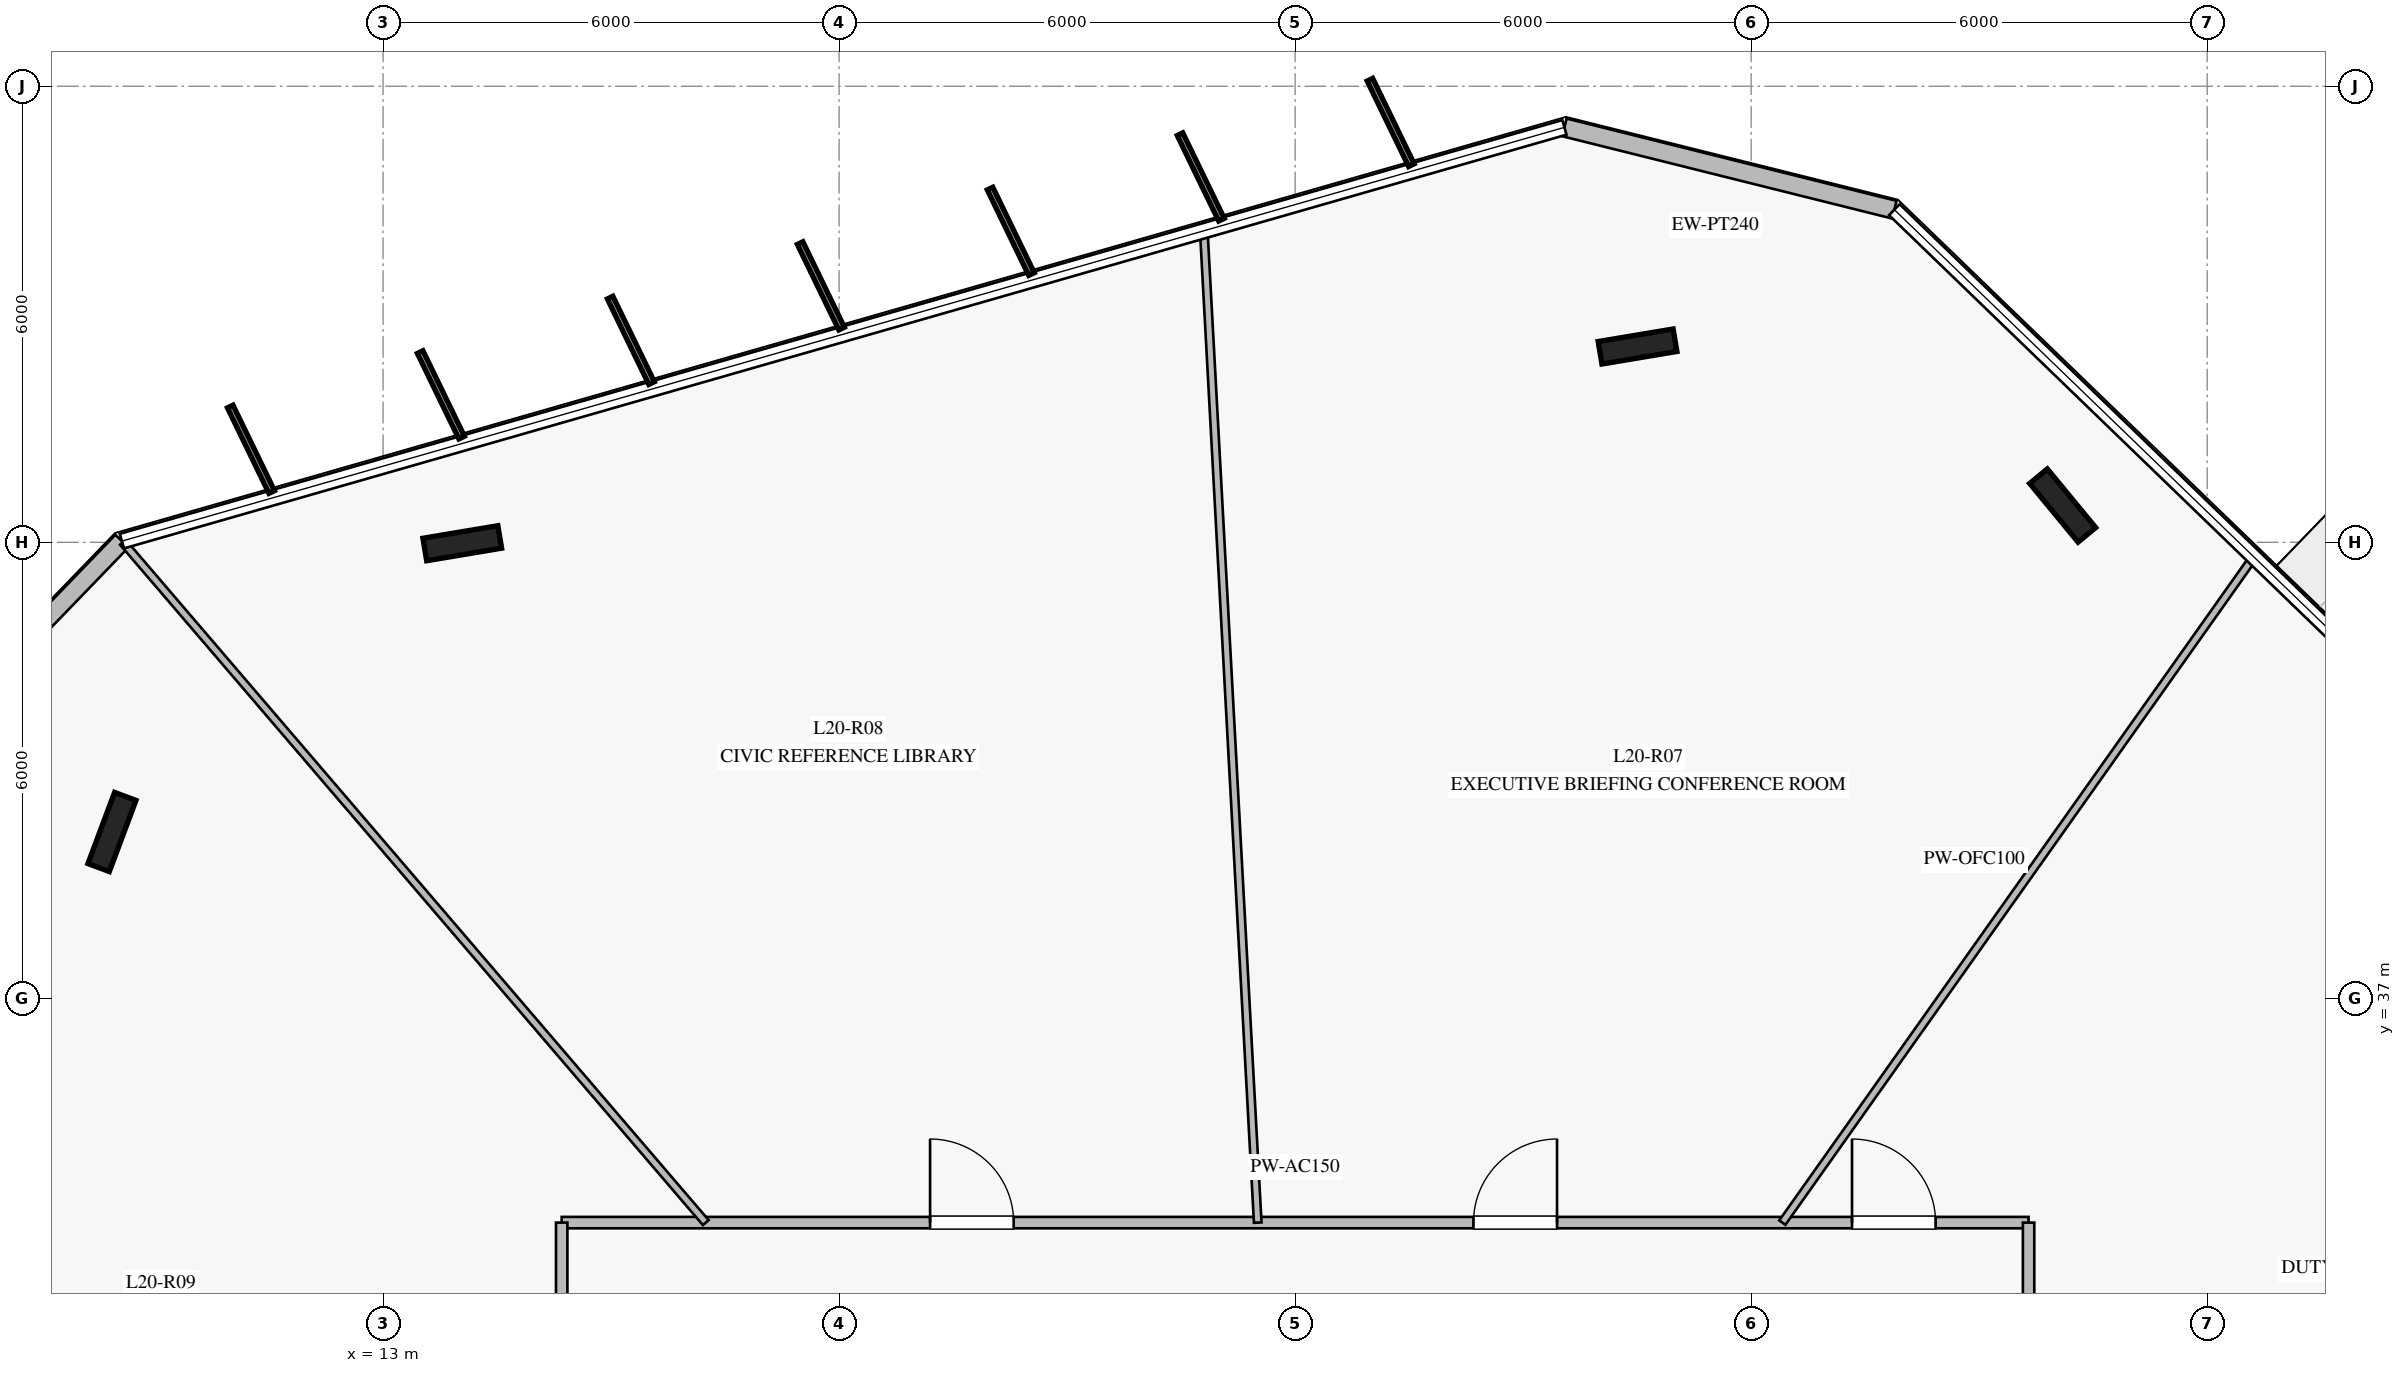
"""IFC4 building model, lengths in metres.
Left out: names, types, materials, properties, quantities, classifications, styles, units other than length and angle.
Written with IfcOpenShell. Run it as: python <this file> out.ifc"""

import sys

from ifc_helpers import new_model, si_unit, direction, frame, frame_2d, origin, origin_2d, place, context, subcontext, project, spatial, rectangle, i_section, extrude, element, fill, save


model = new_model("IFC4")
c1 = context("Model", 3, precision=1e-05, world=origin(), true_north=direction((0.0, 1.0)))
c2 = subcontext(c1, "Body", "Model", "MODEL_VIEW")
j1 = project(units=[si_unit("LENGTHUNIT", "METRE"), si_unit("PLANEANGLEUNIT", "RADIAN")], contexts=[c1])
p1 = place(None, origin())
s1 = spatial("IfcSite", under=j1, at=p1, CompositionType="ELEMENT")
p2 = place(p1, origin())
s2 = spatial("IfcBuilding", under=s1, at=p2, CompositionType="ELEMENT")
p3 = place(p2, frame((0.0, 0.0, 84.0)))
s3 = spatial("IfcBuildingStorey", under=s2, at=p3, CompositionType="ELEMENT", Elevation=84.0)
for number, where, z_axis, x_axis in (
    (1, (35.099, 43.484, 0.0), (0.0, 0.0, 1.0), (-0.636, 0.772, 0.0)),
    (2, (29.505, 45.576, 0.0), (0.0, 0.0, 1.0), (0.986, 0.165, 0.0)),
    (3, (14.042, 42.988, 0.0), (0.0, 0.0, 1.0), (0.986, 0.165, 0.0)),
    (4, (9.433, 39.189, 0.0), (0.0, 0.0, 1.0), (0.35, 0.937, 0.0)),
):
    element("IfcColumn", number, at=place(p3, frame(where, z_axis=z_axis, x_axis=x_axis)), inside=s3, PredefinedType="COLUMN", context=c2, shape_type="SweptSolid", body=[
        extrude(i_section(OverallWidth=0.3, OverallDepth=1.0, WebThickness=0.019, FlangeThickness=0.036, at=origin_2d()), origin(), (0.0, 0.0, 1.0), 4.0),
    ])
p4 = place(p3, frame((32.884, 47.376, 0.0), z_axis=(0.0, 0.0, 1.0), x_axis=(-0.970261147955, 0.242060539471, 0.0)))
e5 = element("IfcWall", 5, at=p4, inside=s3, PredefinedType="STANDARD", context=c2, shape_type="SweptSolid", body=[
    extrude(rectangle(XDim=4.474, YDim=0.24, at=frame_2d((2.237, 0.0))), origin(), (0.0, 0.0, 1.0), 3.76),
])
p5 = place(p3, frame((9.564, 43.016, 0.0), z_axis=(0.0, 0.0, 1.0), x_axis=(-0.694693843806, -0.719305542435, 0.0)))
e6 = element("IfcWall", 6, at=p5, inside=s3, PredefinedType="STANDARD", context=c2, shape_type="SweptSolid", body=[
    extrude(rectangle(XDim=4.474, YDim=0.24, at=frame_2d((2.237, 0.0))), origin(), (0.0, 0.0, 1.0), 3.76),
])
p6 = place(p3, frame((15.35, 34.05, 0.0), z_axis=(0.0, 0.0, 1.0), x_axis=(1.0, 0.0, 0.0)))
e7 = element("IfcWall", 7, at=p6, inside=s3, PredefinedType="PARTITIONING", context=c2, shape_type="SweptSolid", body=[
    extrude(rectangle(XDim=19.3, YDim=0.15, at=frame_2d((9.65, 0.0))), origin(), (0.0, 0.0, 1.0), 3.21),
])
p7 = place(p6, frame((16.977, 0.0, 0.0)))
e8 = element("IfcOpeningElement", 8, at=p7, cuts=e7, PredefinedType="OPENING", context=c2, shape_type="SweptSolid", body=[
    extrude(rectangle(XDim=1.1, YDim=2.2, at=frame_2d((0.55, 1.1))), frame((0.0, 0.085, 0.0), z_axis=(0.0, -1.0, 0.0), x_axis=(1.0, 0.0, 0.0)), (0.0, 0.0, 1.0), 0.17),
])
p8 = place(p6, frame((11.996, 0.0, 0.0)))
e9 = element("IfcOpeningElement", 9, at=p8, cuts=e7, PredefinedType="OPENING", context=c2, shape_type="SweptSolid", body=[
    extrude(rectangle(XDim=1.1, YDim=2.2, at=frame_2d((0.55, 1.1))), frame((0.0, 0.085, 0.0), z_axis=(0.0, -1.0, 0.0), x_axis=(1.0, 0.0, 0.0)), (0.0, 0.0, 1.0), 0.17),
])
p9 = place(p6, frame((4.847, 0.0, 0.0)))
e10 = element("IfcOpeningElement", 10, at=p9, cuts=e7, PredefinedType="OPENING", context=c2, shape_type="SweptSolid", body=[
    extrude(rectangle(XDim=1.1, YDim=2.2, at=frame_2d((0.55, 1.1))), frame((0.0, 0.085, 0.0), z_axis=(0.0, -1.0, 0.0), x_axis=(1.0, 0.0, 0.0)), (0.0, 0.0, 1.0), 0.17),
])
p10 = place(p3, frame((34.65, 34.05, 0.0), z_axis=(0.0, 0.0, 1.0), x_axis=(0.0, -1.0, 0.0)))
e11 = element("IfcWall", 11, at=p10, inside=s3, PredefinedType="PARTITIONING", context=c2, shape_type="SweptSolid", body=[
    extrude(rectangle(XDim=18.1, YDim=0.15, at=frame_2d((9.05, 0.0))), origin(), (0.0, 0.0, 1.0), 3.21),
])
p11 = place(p10, frame((15.308, 0.0, 0.0)))
e12 = element("IfcOpeningElement", 12, at=p11, cuts=e11, PredefinedType="OPENING", context=c2, shape_type="SweptSolid", body=[
    extrude(rectangle(XDim=1.1, YDim=2.2, at=frame_2d((0.55, 1.1))), frame((0.0, 0.085, 0.0), z_axis=(0.0, -1.0, 0.0), x_axis=(1.0, 0.0, 0.0)), (0.0, 0.0, 1.0), 0.17),
])
p12 = place(p10, frame((10.056, 0.0, 0.0)))
e13 = element("IfcOpeningElement", 13, at=p12, cuts=e11, PredefinedType="OPENING", context=c2, shape_type="SweptSolid", body=[
    extrude(rectangle(XDim=1.1, YDim=2.2, at=frame_2d((0.55, 1.1))), frame((0.0, 0.085, 0.0), z_axis=(0.0, -1.0, 0.0), x_axis=(1.0, 0.0, 0.0)), (0.0, 0.0, 1.0), 0.17),
])
p13 = place(p3, frame((15.35, 15.95, 0.0), z_axis=(0.0, 0.0, 1.0), x_axis=(0.0, 1.0, 0.0)))
e14 = element("IfcWall", 14, at=p13, inside=s3, PredefinedType="PARTITIONING", context=c2, shape_type="SweptSolid", body=[
    extrude(rectangle(XDim=18.1, YDim=0.15, at=frame_2d((9.05, 0.0))), origin(), (0.0, 0.0, 1.0), 3.21),
])
p14 = place(p13, frame((12.936, 0.0, 0.0)))
e15 = element("IfcOpeningElement", 15, at=p14, cuts=e14, PredefinedType="OPENING", context=c2, shape_type="SweptSolid", body=[
    extrude(rectangle(XDim=1.1, YDim=2.2, at=frame_2d((0.55, 1.1))), frame((0.0, 0.085, 0.0), z_axis=(0.0, -1.0, 0.0), x_axis=(1.0, 0.0, 0.0)), (0.0, 0.0, 1.0), 0.17),
])
p15 = place(p3, frame((31.41, 34.05, 0.0), z_axis=(0.0, 0.0, 1.0), x_axis=(0.577987627676, 0.816045527071, 0.0)))
e16 = element("IfcWall", 16, at=p15, inside=s3, PredefinedType="MOVABLE", context=c2, shape_type="SweptSolid", body=[
    extrude(rectangle(XDim=10.715, YDim=0.1, at=frame_2d((5.357, 0.0))), origin(), (0.0, 0.0, 1.0), 3.06),
])
p16 = place(p3, frame((24.508, 34.05, 0.0), z_axis=(0.0, 0.0, 1.0), x_axis=(-0.054331204266, 0.998522969312, 0.0)))
e17 = element("IfcWall", 17, at=p16, inside=s3, PredefinedType="MOVABLE", context=c2, shape_type="SweptSolid", body=[
    extrude(rectangle(XDim=13.049, YDim=0.1, at=frame_2d((6.525, 0.0))), origin(), (0.0, 0.0, 1.0), 3.05),
])
p17 = place(p3, frame((17.246, 34.05, 0.0), z_axis=(0.0, 0.0, 1.0), x_axis=(-0.650642961781, 0.759383787215, 0.0)))
e18 = element("IfcWall", 18, at=p17, inside=s3, PredefinedType="MOVABLE", context=c2, shape_type="SweptSolid", body=[
    extrude(rectangle(XDim=11.787, YDim=0.1, at=frame_2d((5.894, 0.0))), origin(), (0.0, 0.0, 1.0), 3.06),
])
p18 = place(p7, origin())
e19 = element("IfcDoor", 19, at=p18, inside=s3, OperationType="SINGLE_SWING_LEFT", PredefinedType="DOOR", context=c2, shape_type="SweptSolid", body=[
    extrude(rectangle(XDim=1.1, YDim=2.2, at=frame_2d((0.55, 1.1))), frame((0.0, 0.025, 0.0), z_axis=(0.0, -1.0, 0.0), x_axis=(1.0, 0.0, 0.0)), (0.0, 0.0, 1.0), 0.05),
])
fill(e8, e19)
p19 = place(p8, origin())
e20 = element("IfcDoor", 20, at=p19, inside=s3, OperationType="SINGLE_SWING_RIGHT", PredefinedType="DOOR", context=c2, shape_type="SweptSolid", body=[
    extrude(rectangle(XDim=1.1, YDim=2.2, at=frame_2d((0.55, 1.1))), frame((0.0, 0.025, 0.0), z_axis=(0.0, -1.0, 0.0), x_axis=(1.0, 0.0, 0.0)), (0.0, 0.0, 1.0), 0.05),
])
fill(e9, e20)
p20 = place(p9, origin())
e21 = element("IfcDoor", 21, at=p20, inside=s3, OperationType="SINGLE_SWING_LEFT", PredefinedType="DOOR", context=c2, shape_type="SweptSolid", body=[
    extrude(rectangle(XDim=1.1, YDim=2.2, at=frame_2d((0.55, 1.1))), frame((0.0, 0.025, 0.0), z_axis=(0.0, -1.0, 0.0), x_axis=(1.0, 0.0, 0.0)), (0.0, 0.0, 1.0), 0.05),
])
fill(e10, e21)
save(model, sys.argv[1])
